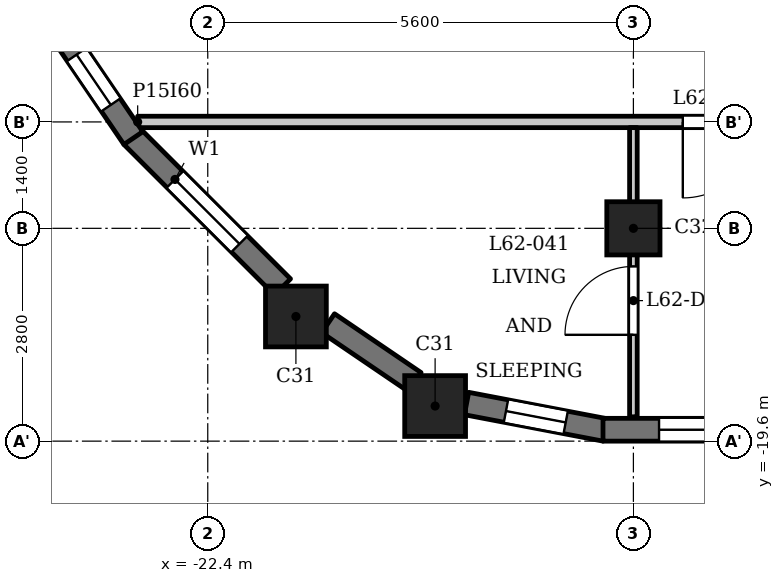
"""IFC4 building model, lengths in metres.
Left out: names, types, materials, properties, quantities, classifications, styles, units other than length and angle.
Written with IfcOpenShell. Run it as: python <this file> out.ifc"""

import sys

from ifc_helpers import new_model, si_unit, direction, frame, frame_2d, origin, origin_2d, place, context, subcontext, project, spatial, rectangle, extrude, element, fill, save


model = new_model("IFC4")
c1 = context("Model", 3, precision=1e-05, world=origin(), true_north=direction((0.0, 1.0)))
c2 = subcontext(c1, "Body", "Model", "MODEL_VIEW")
j1 = project(units=[si_unit("LENGTHUNIT", "METRE"), si_unit("PLANEANGLEUNIT", "RADIAN")], contexts=[c1])
p1 = place(None, origin())
s1 = spatial("IfcSite", under=j1, at=p1, CompositionType="ELEMENT")
p2 = place(p1, origin())
s2 = spatial("IfcBuilding", under=s1, at=p2, CompositionType="ELEMENT")
p3 = place(p2, frame((0.0, 0.0, 241.7)))
s3 = spatial("IfcBuildingStorey", under=s2, at=p3, CompositionType="ELEMENT", Elevation=241.7)
for number, where, z_axis, x_axis in (
    (1, (-19.409, -19.138, 0.0), (0.0, 0.0, 1.0), (1.0, 0.0, 0.0)),
    (2, (-21.24, -17.96, 0.0), (0.0, 0.0, 1.0), (1.0, 0.0, 0.0)),
):
    element("IfcColumn", number, at=place(p3, frame(where, z_axis=z_axis, x_axis=x_axis)), inside=s3, PredefinedType="COLUMN", context=c2, shape_type="SweptSolid", body=[
        extrude(rectangle(XDim=0.8, YDim=0.8, at=origin_2d()), origin(), (0.0, 0.0, 1.0), 3.5),
    ])
p4 = place(p3, frame((-16.8, -16.8, 0.0), z_axis=(0.0, 0.0, 1.0), x_axis=(1.0, 0.0, 0.0)))
e3 = element("IfcColumn", 3, at=p4, inside=s3, PredefinedType="COLUMN", context=c2, shape_type="SweptSolid", body=[
    extrude(rectangle(XDim=0.7, YDim=0.7, at=origin_2d()), origin(), (0.0, 0.0, 1.0), 3.5),
])
p5 = place(p3, frame((-23.397, -15.591, 0.0), z_axis=(0.0, 0.0, 1.0), x_axis=(0.707150377276, -0.707063182409, 0.0)))
e4 = element("IfcWall", 4, at=p5, inside=s3, PredefinedType="SOLIDWALL", context=c2, shape_type="SweptSolid", body=[
    extrude(rectangle(XDim=2.8, YDim=0.3, at=frame_2d((1.4, 0.0))), origin(), (0.0, 0.0, 1.0), 2.55),
])
p6 = place(p5, frame((0.8, 0.0, 0.6)))
e5 = element("IfcOpeningElement", 5, at=p6, cuts=e4, PredefinedType="OPENING", context=c2, shape_type="SweptSolid", body=[
    extrude(rectangle(XDim=1.2, YDim=1.55, at=frame_2d((0.6, 0.775))), frame((0.0, 0.16, 0.0), z_axis=(0.0, -1.0, 0.0), x_axis=(1.0, 0.0, 0.0)), (0.0, 0.0, 1.0), 0.32),
])
p7 = place(p3, frame((-20.817, -18.048, 0.0), z_axis=(0.0, 0.0, 1.0), x_axis=(0.827025410886, -0.562164539747, 0.0)))
e6 = element("IfcWall", 6, at=p7, inside=s3, PredefinedType="SOLIDWALL", context=c2, shape_type="SweptSolid", body=[
    extrude(rectangle(XDim=1.377, YDim=0.3, at=frame_2d((0.688, 0.0))), origin(), (0.0, 0.0, 1.0), 2.55),
])
p8 = place(p3, frame((-18.995, -19.105, 0.0), z_axis=(0.0, 0.0, 1.0), x_axis=(0.982301706131, -0.187305520826, 0.0)))
e7 = element("IfcWall", 7, at=p8, inside=s3, PredefinedType="SOLIDWALL", context=c2, shape_type="SweptSolid", body=[
    extrude(rectangle(XDim=1.856, YDim=0.3, at=frame_2d((0.928, 0.0))), origin(), (0.0, 0.0, 1.0), 2.55),
])
p9 = place(p8, frame((0.528, 0.0, 0.6)))
e8 = element("IfcOpeningElement", 8, at=p9, cuts=e7, PredefinedType="OPENING", context=c2, shape_type="SweptSolid", body=[
    extrude(rectangle(XDim=0.8, YDim=1.55, at=frame_2d((0.4, 0.775))), frame((0.0, 0.16, 0.0), z_axis=(0.0, -1.0, 0.0), x_axis=(1.0, 0.0, 0.0)), (0.0, 0.0, 1.0), 0.32),
])
p10 = place(p3, frame((-17.2, -19.45, 0.0), z_axis=(0.0, 0.0, 1.0), x_axis=(1.0, 0.0, 0.0)))
e9 = element("IfcWall", 9, at=p10, inside=s3, PredefinedType="SOLIDWALL", context=c2, shape_type="SweptSolid", body=[
    extrude(rectangle(XDim=2.8, YDim=0.3, at=frame_2d((1.4, 0.0))), origin(), (0.0, 0.0, 1.0), 2.55),
])
p11 = place(p10, frame((0.738, 0.0, 0.9)))
e10 = element("IfcOpeningElement", 10, at=p11, cuts=e9, PredefinedType="OPENING", context=c2, shape_type="SweptSolid", body=[
    extrude(rectangle(XDim=1.8, YDim=1.25, at=frame_2d((0.9, 0.625))), frame((0.0, 0.16, 0.0), z_axis=(0.0, -1.0, 0.0), x_axis=(1.0, 0.0, 0.0)), (0.0, 0.0, 1.0), 0.32),
])
p12 = place(p3, frame((-24.422, -14.078, 0.0), z_axis=(0.0, 0.0, 1.0), x_axis=(0.562054549384, -0.827100165347, 0.0)))
e11 = element("IfcWall", 11, at=p12, inside=s3, PredefinedType="SOLIDWALL", context=c2, shape_type="SweptSolid", body=[
    extrude(rectangle(XDim=1.856, YDim=0.3, at=frame_2d((0.928, 0.0))), origin(), (0.0, 0.0, 1.0), 2.55),
])
p13 = place(p12, frame((0.528, 0.0, 0.6)))
e12 = element("IfcOpeningElement", 12, at=p13, cuts=e11, PredefinedType="OPENING", context=c2, shape_type="SweptSolid", body=[
    extrude(rectangle(XDim=0.8, YDim=1.55, at=frame_2d((0.4, 0.775))), frame((0.0, 0.16, 0.0), z_axis=(0.0, -1.0, 0.0), x_axis=(1.0, 0.0, 0.0)), (0.0, 0.0, 1.0), 0.32),
])
p14 = place(p3, frame((-23.322, -15.4, 0.0), z_axis=(0.0, 0.0, 1.0), x_axis=(1.0, 0.0, 0.0)))
e13 = element("IfcWall", 13, at=p14, inside=s3, PredefinedType="PARTITIONING", context=c2, shape_type="SweptSolid", body=[
    extrude(rectangle(XDim=46.872, YDim=0.15, at=frame_2d((23.436, 0.0))), origin(), (0.0, 0.0, 1.0), 3.2),
])
p15 = place(p14, frame((7.172, 0.0, 0.0)))
e14 = element("IfcOpeningElement", 14, at=p15, cuts=e13, PredefinedType="OPENING", context=c2, shape_type="SweptSolid", body=[
    extrude(rectangle(XDim=1.0, YDim=2.1, at=frame_2d((0.5, 1.05))), frame((0.0, 0.085, 0.0), z_axis=(0.0, -1.0, 0.0), x_axis=(1.0, 0.0, 0.0)), (0.0, 0.0, 1.0), 0.17),
])
p16 = place(p14, frame((16.172, 0.0, 0.0)))
e15 = element("IfcOpeningElement", 15, at=p16, cuts=e13, PredefinedType="OPENING", context=c2, shape_type="SweptSolid", body=[
    extrude(rectangle(XDim=1.0, YDim=2.1, at=frame_2d((0.5, 1.05))), frame((0.0, 0.085, 0.0), z_axis=(0.0, -1.0, 0.0), x_axis=(1.0, 0.0, 0.0)), (0.0, 0.0, 1.0), 0.17),
])
p17 = place(p14, frame((26.372, 0.0, 0.0)))
e16 = element("IfcOpeningElement", 16, at=p17, cuts=e13, PredefinedType="OPENING", context=c2, shape_type="SweptSolid", body=[
    extrude(rectangle(XDim=1.0, YDim=2.1, at=frame_2d((0.5, 1.05))), frame((0.0, 0.085, 0.0), z_axis=(0.0, -1.0, 0.0), x_axis=(1.0, 0.0, 0.0)), (0.0, 0.0, 1.0), 0.17),
])
p18 = place(p14, frame((38.572, 0.0, 0.0)))
e17 = element("IfcOpeningElement", 17, at=p18, cuts=e13, PredefinedType="OPENING", context=c2, shape_type="SweptSolid", body=[
    extrude(rectangle(XDim=1.0, YDim=2.1, at=frame_2d((0.5, 1.05))), frame((0.0, 0.085, 0.0), z_axis=(0.0, -1.0, 0.0), x_axis=(1.0, 0.0, 0.0)), (0.0, 0.0, 1.0), 0.17),
])
p19 = place(p3, frame((-16.8, -19.28, 0.0), z_axis=(0.0, 0.0, 1.0), x_axis=(0.0, 1.0, 0.0)))
e18 = element("IfcWall", 18, at=p19, inside=s3, PredefinedType="PARTITIONING", context=c2, shape_type="SweptSolid", body=[
    extrude(rectangle(XDim=3.805, YDim=0.1, at=frame_2d((1.902, 0.0))), origin(), (0.0, 0.0, 1.0), 3.2),
])
p20 = place(p19, frame((1.079, 0.0, 0.0)))
e19 = element("IfcOpeningElement", 19, at=p20, cuts=e18, PredefinedType="OPENING", context=c2, shape_type="SweptSolid", body=[
    extrude(rectangle(XDim=0.9, YDim=2.1, at=frame_2d((0.45, 1.05))), frame((0.0, 0.06, 0.0), z_axis=(0.0, -1.0, 0.0), x_axis=(1.0, 0.0, 0.0)), (0.0, 0.0, 1.0), 0.12),
])
p21 = place(p15, origin())
e20 = element("IfcDoor", 20, at=p21, inside=s3, OperationType="SINGLE_SWING_LEFT", PredefinedType="DOOR", context=c2, shape_type="SweptSolid", body=[
    extrude(rectangle(XDim=1.0, YDim=2.1, at=frame_2d((0.5, 1.05))), frame((0.0, 0.025, 0.0), z_axis=(0.0, -1.0, 0.0), x_axis=(1.0, 0.0, 0.0)), (0.0, 0.0, 1.0), 0.05),
])
fill(e14, e20)
p22 = place(p20, origin())
e21 = element("IfcDoor", 21, at=p22, inside=s3, OperationType="SINGLE_SWING_RIGHT", PredefinedType="DOOR", context=c2, shape_type="SweptSolid", body=[
    extrude(rectangle(XDim=0.9, YDim=2.1, at=frame_2d((0.45, 1.05))), frame((0.0, 0.025, 0.0), z_axis=(0.0, -1.0, 0.0), x_axis=(1.0, 0.0, 0.0)), (0.0, 0.0, 1.0), 0.05),
])
fill(e19, e21)
p23 = place(p6, origin())
e22 = element("IfcWindow", 22, at=p23, inside=s3, PartitioningType="SINGLE_PANEL", PredefinedType="WINDOW", context=c2, shape_type="SweptSolid", body=[
    extrude(rectangle(XDim=1.2, YDim=1.55, at=frame_2d((0.6, 0.775))), frame((0.0, 0.03, 0.0), z_axis=(0.0, -1.0, 0.0), x_axis=(1.0, 0.0, 0.0)), (0.0, 0.0, 1.0), 0.06),
])
fill(e5, e22)
p24 = place(p9, origin())
e23 = element("IfcWindow", 23, at=p24, inside=s3, PartitioningType="SINGLE_PANEL", PredefinedType="WINDOW", context=c2, shape_type="SweptSolid", body=[
    extrude(rectangle(XDim=0.8, YDim=1.55, at=frame_2d((0.4, 0.775))), frame((0.0, 0.03, 0.0), z_axis=(0.0, -1.0, 0.0), x_axis=(1.0, 0.0, 0.0)), (0.0, 0.0, 1.0), 0.06),
])
fill(e8, e23)
p25 = place(p11, origin())
e24 = element("IfcWindow", 24, at=p25, inside=s3, PartitioningType="SINGLE_PANEL", PredefinedType="WINDOW", context=c2, shape_type="SweptSolid", body=[
    extrude(rectangle(XDim=1.8, YDim=1.25, at=frame_2d((0.9, 0.625))), frame((0.0, 0.03, 0.0), z_axis=(0.0, -1.0, 0.0), x_axis=(1.0, 0.0, 0.0)), (0.0, 0.0, 1.0), 0.06),
])
fill(e10, e24)
p26 = place(p13, origin())
e25 = element("IfcWindow", 25, at=p26, inside=s3, PartitioningType="SINGLE_PANEL", PredefinedType="WINDOW", context=c2, shape_type="SweptSolid", body=[
    extrude(rectangle(XDim=0.8, YDim=1.55, at=frame_2d((0.4, 0.775))), frame((0.0, 0.03, 0.0), z_axis=(0.0, -1.0, 0.0), x_axis=(1.0, 0.0, 0.0)), (0.0, 0.0, 1.0), 0.06),
])
fill(e12, e25)
save(model, sys.argv[1])
